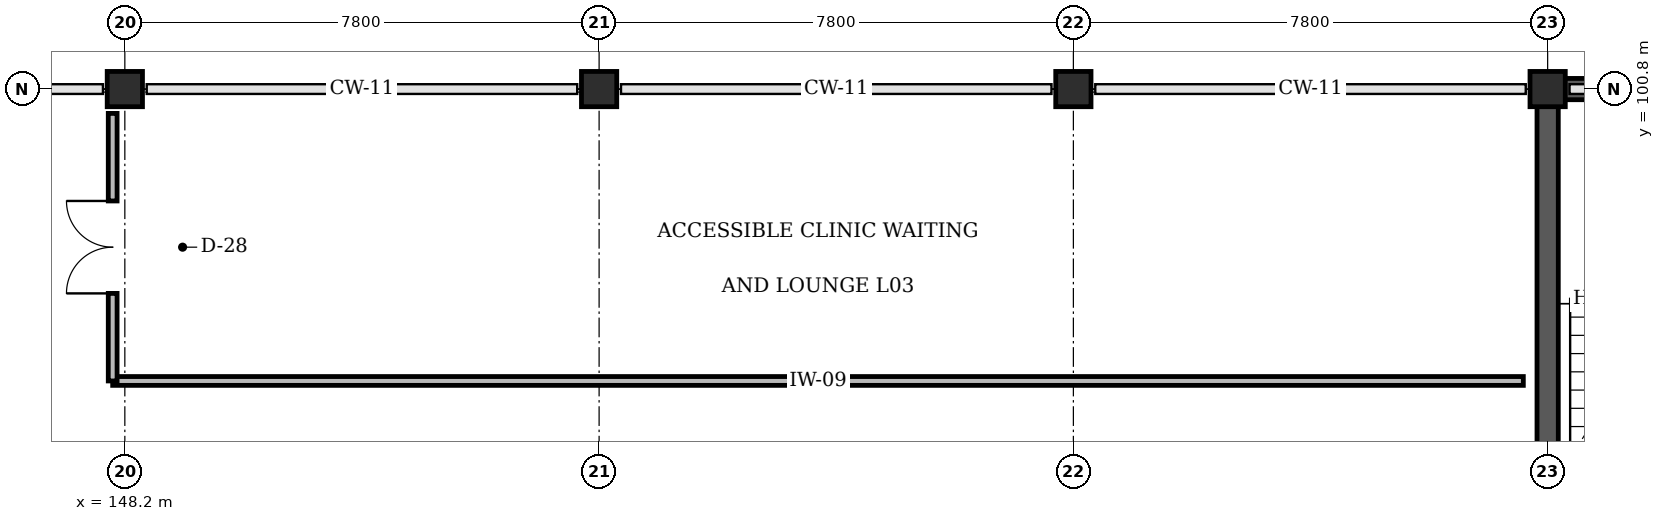
"""IFC4 building model, lengths in metres.
Left out: names, types, materials, properties, quantities, classifications, styles, units other than length and angle.
Written with IfcOpenShell. Run it as: python <this file> out.ifc"""

import sys

from ifc_helpers import new_model, si_unit, direction, frame, frame_2d, origin, origin_2d, place, context, subcontext, project, spatial, rectangle, extrude, element, fill, save


model = new_model("IFC4")
c1 = context("Model", 3, precision=1e-05, world=origin(), true_north=direction((0.0, 1.0)))
c2 = subcontext(c1, "Body", "Model", "MODEL_VIEW")
j1 = project(units=[si_unit("LENGTHUNIT", "METRE"), si_unit("PLANEANGLEUNIT", "RADIAN")], contexts=[c1])
p1 = place(None, origin())
s1 = spatial("IfcSite", under=j1, at=p1, CompositionType="ELEMENT")
p2 = place(p1, origin())
s2 = spatial("IfcBuilding", under=s1, at=p2, CompositionType="ELEMENT")
p3 = place(p2, frame((0.0, 0.0, 14.4)))
s3 = spatial("IfcBuildingStorey", under=s2, at=p3, CompositionType="ELEMENT", Elevation=14.4)
p4 = place(p3, frame((171.425, 100.8, 0.0), z_axis=(0.0, 0.0, 1.0), x_axis=(1.0, 0.0, 0.0)))
e1 = element("IfcWall", 1, at=p4, inside=s3, PredefinedType="SHEAR", context=c2, shape_type="SweptSolid", body=[
    extrude(rectangle(XDim=8.15, YDim=0.35, at=frame_2d((4.075, 0.0))), origin(), (0.0, 0.0, 1.0), 3.28),
])
p5 = place(p3, frame((171.6, 92.4, 0.0), z_axis=(0.0, 0.0, 1.0), x_axis=(0.0, 1.0, 0.0)))
e2 = element("IfcWall", 2, at=p5, inside=s3, PredefinedType="SHEAR", context=c2, shape_type="SweptSolid", body=[
    extrude(rectangle(XDim=8.4, YDim=0.35, at=frame_2d((4.2, 0.0))), origin(), (0.0, 0.0, 1.0), 3.28),
])
for number, where, z_axis, x_axis in (
    (3, (148.2, 100.8, 0.0), (0.0, 0.0, 1.0), (1.0, 0.0, 0.0)),
    (4, (156.0, 100.8, 0.0), (0.0, 0.0, 1.0), (1.0, 0.0, 0.0)),
    (5, (163.8, 100.8, 0.0), (0.0, 0.0, 1.0), (1.0, 0.0, 0.0)),
    (6, (171.6, 100.8, 0.0), (0.0, 0.0, 1.0), (1.0, 0.0, 0.0)),
):
    element("IfcColumn", number, at=place(p3, frame(where, z_axis=z_axis, x_axis=x_axis)), inside=s3, PredefinedType="COLUMN", context=c2, shape_type="SweptSolid", body=[
        extrude(rectangle(XDim=0.58, YDim=0.58, at=origin_2d()), origin(), (0.0, 0.0, 1.0), 3.6),
    ])
p6 = place(p3, frame((148.0, 96.0, 0.0), z_axis=(0.0, 0.0, 1.0), x_axis=(1.0, 0.0, 0.0)))
e7 = element("IfcWall", 7, at=p6, inside=s3, PredefinedType="PARTITIONING", context=c2, shape_type="SweptSolid", body=[
    extrude(rectangle(XDim=23.2, YDim=0.145, at=frame_2d((11.6, 0.0))), origin(), (0.0, 0.0, 1.0), 3.3),
])
p7 = place(p3, frame((148.0, 96.0, 0.0), z_axis=(0.0, 0.0, 1.0), x_axis=(0.0, 1.0, 0.0)))
e8 = element("IfcWall", 8, at=p7, inside=s3, PredefinedType="PARTITIONING", context=c2, shape_type="SweptSolid", body=[
    extrude(rectangle(XDim=4.4, YDim=0.145, at=frame_2d((2.2, 0.0))), origin(), (0.0, 0.0, 1.0), 2.605),
])
p8 = place(p7, frame((1.44, 0.0, 0.0)))
e9 = element("IfcOpeningElement", 9, at=p8, cuts=e8, PredefinedType="OPENING", context=c2, shape_type="SweptSolid", body=[
    extrude(rectangle(XDim=1.52, YDim=2.2, at=frame_2d((0.76, 1.1))), frame((0.0, 0.083, 0.0), z_axis=(0.0, -1.0, 0.0), x_axis=(1.0, 0.0, 0.0)), (0.0, 0.0, 1.0), 0.165),
])
p9 = place(p8, origin())
e10 = element("IfcDoor", 10, at=p9, inside=s3, OperationType="DOUBLE_DOOR_SINGLE_SWING", PredefinedType="DOOR", context=c2, shape_type="SweptSolid", body=[
    extrude(rectangle(XDim=1.52, YDim=2.2, at=frame_2d((0.76, 1.1))), frame((0.0, 0.025, 0.0), z_axis=(0.0, -1.0, 0.0), x_axis=(1.0, 0.0, 0.0)), (0.0, 0.0, 1.0), 0.05),
])
fill(e9, e10)
save(model, sys.argv[1])
